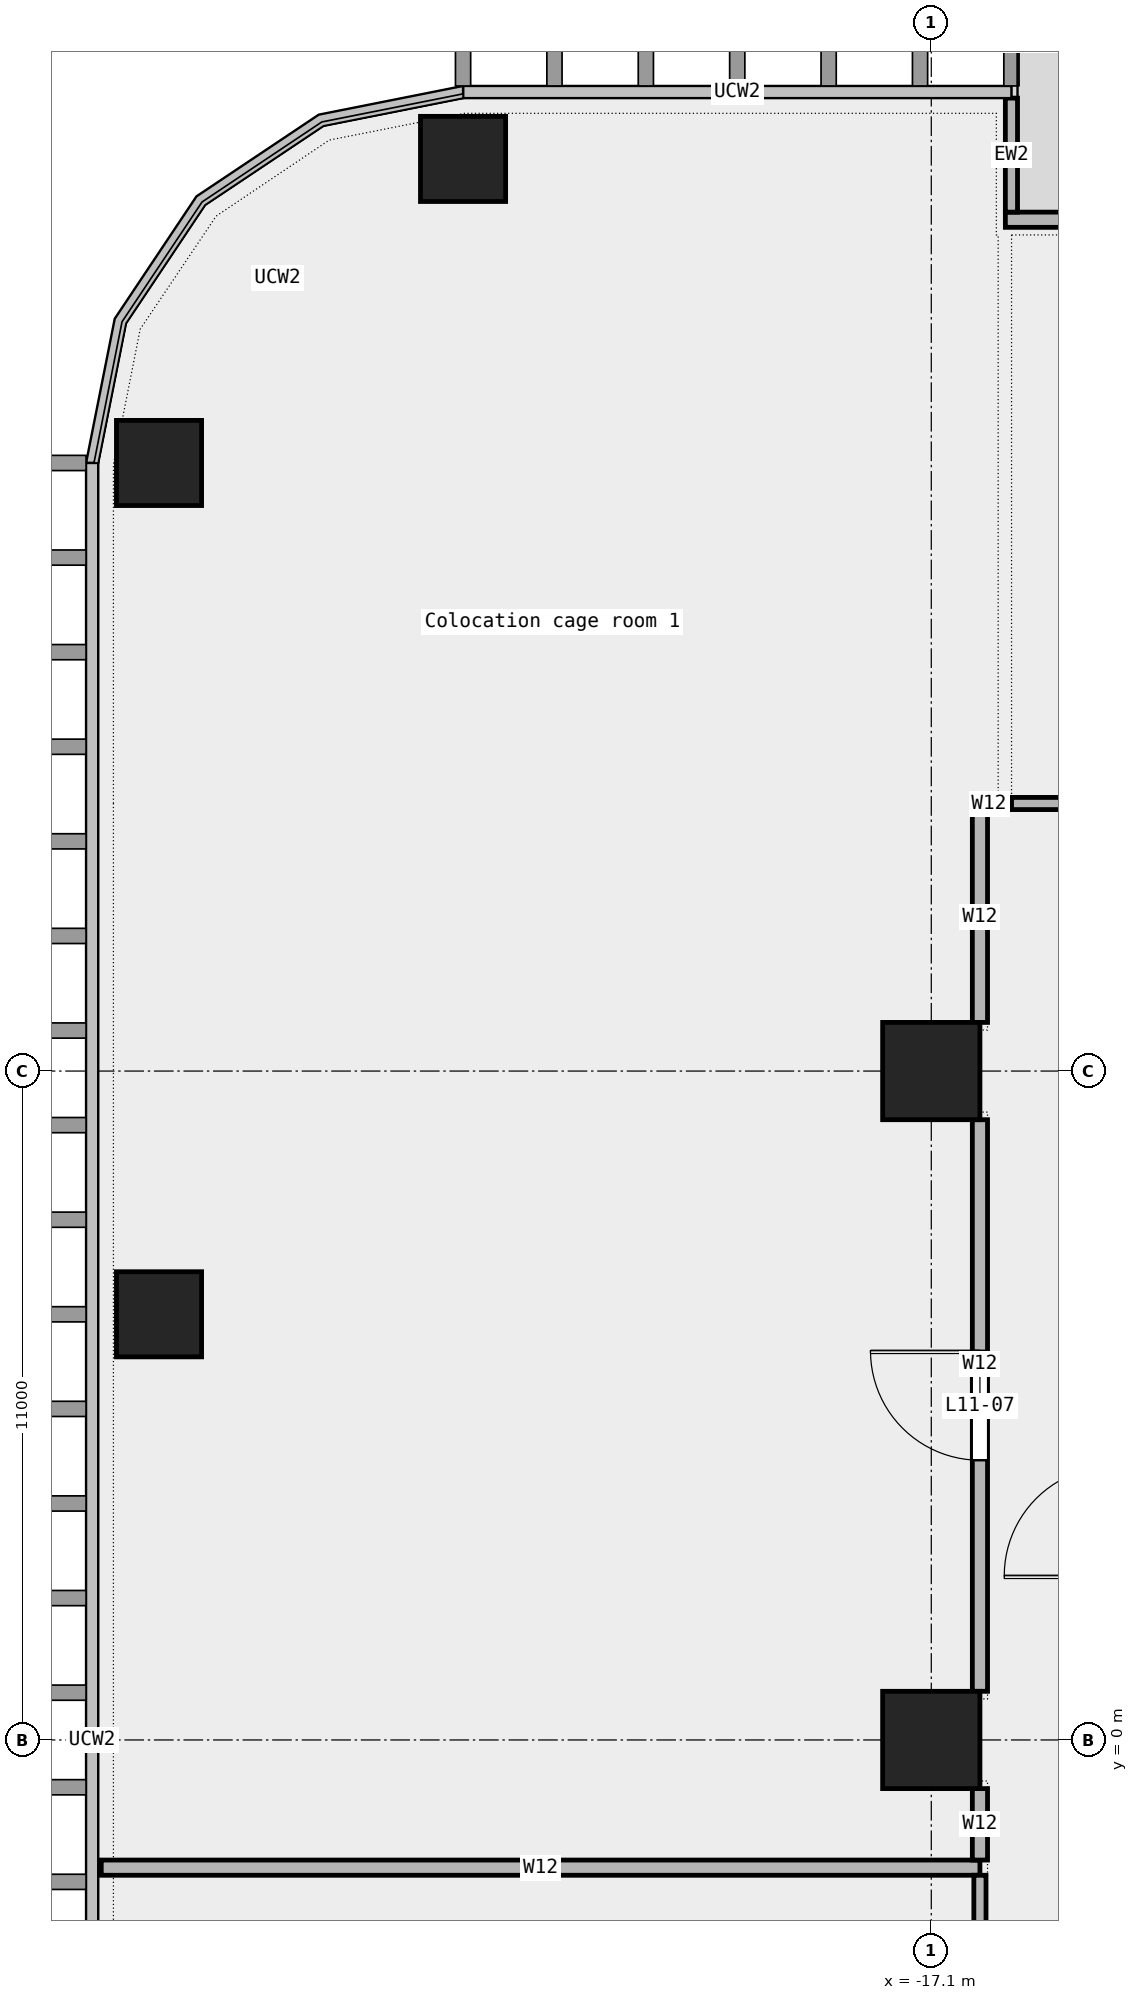
"""IFC4 building model, lengths in metres.
Left out: names, types, materials, properties, quantities, classifications, styles, units other than length and angle.
Written with IfcOpenShell. Run it as: python <this file> out.ifc"""

import sys

from ifc_helpers import new_model, si_unit, direction, frame, frame_2d, origin, origin_2d, place, context, subcontext, project, spatial, rectangle, extrude, element, fill, save


model = new_model("IFC4")
c1 = context("Model", 3, precision=1e-05, world=origin(), true_north=direction((0.0, 1.0)))
c2 = subcontext(c1, "Body", "Model", "MODEL_VIEW")
j1 = project(units=[si_unit("LENGTHUNIT", "METRE"), si_unit("PLANEANGLEUNIT", "RADIAN")], contexts=[c1])
p1 = place(None, origin())
s1 = spatial("IfcSite", under=j1, at=p1, CompositionType="ELEMENT")
p2 = place(p1, origin())
s2 = spatial("IfcBuilding", under=s1, at=p2, CompositionType="ELEMENT")
p3 = place(p2, frame((0.0, 0.0, 59.8)))
s3 = spatial("IfcBuildingStorey", under=s2, at=p3, CompositionType="ELEMENT", Elevation=59.8)
for number, where, z_axis, x_axis in (
    (1, (-24.8, 26.0, 0.0), (0.0, 0.0, 1.0), (1.0, 0.0, 0.0)),
    (2, (-29.8, 21.0, 0.0), (0.0, 0.0, 1.0), (1.0, 0.0, 0.0)),
    (3, (-29.8, 7.0, 0.0), (0.0, 0.0, 1.0), (1.0, 0.0, 0.0)),
):
    element("IfcColumn", number, at=place(p3, frame(where, z_axis=z_axis, x_axis=x_axis)), inside=s3, PredefinedType="COLUMN", context=c2, shape_type="SweptSolid", body=[
        extrude(rectangle(XDim=1.4, YDim=1.4, at=origin_2d()), origin(), (0.0, 0.0, 1.0), 4.35),
    ])
for number, where, z_axis, x_axis in (
    (4, (-17.1, 0.0, 0.0), (0.0, 0.0, 1.0), (1.0, 0.0, 0.0)),
    (5, (-17.1, 11.0, 0.0), (0.0, 0.0, 1.0), (1.0, 0.0, 0.0)),
):
    element("IfcColumn", number, at=place(p3, frame(where, z_axis=z_axis, x_axis=x_axis)), inside=s3, PredefinedType="COLUMN", context=c2, shape_type="SweptSolid", body=[
        extrude(rectangle(XDim=1.6, YDim=1.6, at=origin_2d()), origin(), (0.0, 0.0, 1.0), 4.35),
    ])
p4 = place(p3, frame((-2.155, 25.0, 0.0), z_axis=(0.0, 0.0, 1.0), x_axis=(-1.0, 0.0, 0.0)))
e6 = element("IfcWall", 6, at=p4, inside=s3, PredefinedType="STANDARD", context=c2, shape_type="SweptSolid", body=[
    extrude(rectangle(XDim=13.727, YDim=0.25, at=frame_2d((6.864, 0.0))), origin(), (0.0, 0.0, 1.0), 4.35),
])
p5 = place(p4, frame((1.75, 0.0, 0.45)))
e7 = element("IfcOpeningElement", 7, at=p5, cuts=e6, PredefinedType="OPENING", context=c2, shape_type="SweptSolid", body=[
    extrude(rectangle(XDim=1.5, YDim=3.0, at=frame_2d((0.75, 1.5))), frame((0.0, 0.137, 0.0), z_axis=(0.0, -1.0, 0.0), x_axis=(1.0, 0.0, 0.0)), (0.0, 0.0, 1.0), 0.274),
])
p6 = place(p4, frame((6.0, 0.0, 0.0)))
e8 = element("IfcOpeningElement", 8, at=p6, cuts=e6, PredefinedType="OPENING", context=c2, shape_type="SweptSolid", body=[
    extrude(rectangle(XDim=1.8, YDim=2.4, at=frame_2d((0.9, 1.2))), frame((0.0, 0.137, 0.0), z_axis=(0.0, -1.0, 0.0), x_axis=(1.0, 0.0, 0.0)), (0.0, 0.0, 1.0), 0.274),
])
p7 = place(p4, frame((11.25, 0.0, 0.45)))
e9 = element("IfcOpeningElement", 9, at=p7, cuts=e6, PredefinedType="OPENING", context=c2, shape_type="SweptSolid", body=[
    extrude(rectangle(XDim=1.5, YDim=3.0, at=frame_2d((0.75, 1.5))), frame((0.0, 0.137, 0.0), z_axis=(0.0, -1.0, 0.0), x_axis=(1.0, 0.0, 0.0)), (0.0, 0.0, 1.0), 0.274),
])
p8 = place(p3, frame((-15.782, 27.0, 0.0), z_axis=(0.0, 0.0, 1.0), x_axis=(0.0, -1.0, 0.0)))
e10 = element("IfcWall", 10, at=p8, inside=s3, PredefinedType="STANDARD", context=c2, shape_type="SweptSolid", body=[
    extrude(rectangle(XDim=1.875, YDim=0.2, at=frame_2d((0.938, 0.0))), origin(), (0.0, 0.0, 1.0), 4.35),
])
p9 = place(p3, frame((-30.75, -2.1, 0.0), z_axis=(0.0, 0.0, 1.0), x_axis=(1.0, 0.0, 0.0)))
e11 = element("IfcWall", 11, at=p9, inside=s3, PredefinedType="PARTITIONING", context=c2, shape_type="SweptSolid", body=[
    extrude(rectangle(XDim=14.45, YDim=0.25, at=frame_2d((7.225, 0.0))), origin(), (0.0, 0.0, 1.0), 4.35),
])
p10 = place(p3, frame((-15.78, 15.4, 0.0), z_axis=(0.0, 0.0, 1.0), x_axis=(1.0, 0.0, 0.0)))
e12 = element("IfcWall", 12, at=p10, inside=s3, PredefinedType="PARTITIONING", context=c2, shape_type="SweptSolid", body=[
    extrude(rectangle(XDim=25.965, YDim=0.2, at=frame_2d((12.982, 0.0))), origin(), (0.0, 0.0, 1.0), 4.35),
])
p11 = place(p10, frame((19.395, 0.0, 0.0)))
e13 = element("IfcOpeningElement", 13, at=p11, cuts=e12, PredefinedType="OPENING", context=c2, shape_type="SweptSolid", body=[
    extrude(rectangle(XDim=1.5, YDim=2.1, at=frame_2d((0.75, 1.05))), frame((0.0, 0.112, 0.0), z_axis=(0.0, -1.0, 0.0), x_axis=(1.0, 0.0, 0.0)), (0.0, 0.0, 1.0), 0.224),
])
p12 = place(p10, frame((6.012, 0.0, 0.0)))
e14 = element("IfcOpeningElement", 14, at=p12, cuts=e12, PredefinedType="OPENING", context=c2, shape_type="SweptSolid", body=[
    extrude(rectangle(XDim=1.5, YDim=2.1, at=frame_2d((0.75, 1.05))), frame((0.0, 0.112, 0.0), z_axis=(0.0, -1.0, 0.0), x_axis=(1.0, 0.0, 0.0)), (0.0, 0.0, 1.0), 0.224),
])
p13 = place(p3, frame((-16.3, 15.4, 0.0), z_axis=(0.0, 0.0, 1.0), x_axis=(1.0, 0.0, 0.0)))
e15 = element("IfcWall", 15, at=p13, inside=s3, PredefinedType="PARTITIONING", context=c2, shape_type="SweptSolid", body=[
    extrude(rectangle(XDim=0.3, YDim=0.25, at=frame_2d((0.15, 0.0))), origin(), (0.0, 0.0, 1.0), 4.35),
])
p14 = place(p3, frame((-16.3, -8.975, 0.0), z_axis=(0.0, 0.0, 1.0), x_axis=(0.0, 1.0, 0.0)))
e16 = element("IfcWall", 16, at=p14, inside=s3, PredefinedType="PARTITIONING", context=c2, shape_type="SweptSolid", body=[
    extrude(rectangle(XDim=6.75, YDim=0.2, at=frame_2d((3.375, 0.0))), origin(), (0.0, 0.0, 1.0), 4.35),
])
p15 = place(p14, frame((2.625, 0.0, 0.0)))
e17 = element("IfcOpeningElement", 17, at=p15, cuts=e16, PredefinedType="OPENING", context=c2, shape_type="SweptSolid", body=[
    extrude(rectangle(XDim=1.5, YDim=2.1, at=frame_2d((0.75, 1.05))), frame((0.0, 0.112, 0.0), z_axis=(0.0, -1.0, 0.0), x_axis=(1.0, 0.0, 0.0)), (0.0, 0.0, 1.0), 0.224),
])
p16 = place(p3, frame((-16.3, -1.975, 0.0), z_axis=(0.0, 0.0, 1.0), x_axis=(0.0, 1.0, 0.0)))
e18 = element("IfcWall", 18, at=p16, inside=s3, PredefinedType="PARTITIONING", context=c2, shape_type="SweptSolid", body=[
    extrude(rectangle(XDim=1.175, YDim=0.25, at=frame_2d((0.587, 0.0))), origin(), (0.0, 0.0, 1.0), 4.35),
])
p17 = place(p3, frame((-16.3, 0.8, 0.0), z_axis=(0.0, 0.0, 1.0), x_axis=(0.0, 1.0, 0.0)))
e19 = element("IfcWall", 19, at=p17, inside=s3, PredefinedType="PARTITIONING", context=c2, shape_type="SweptSolid", body=[
    extrude(rectangle(XDim=9.4, YDim=0.25, at=frame_2d((4.7, 0.0))), origin(), (0.0, 0.0, 1.0), 4.35),
])
p18 = place(p17, frame((3.8, 0.0, 0.0)))
e20 = element("IfcOpeningElement", 20, at=p18, cuts=e19, PredefinedType="OPENING", context=c2, shape_type="SweptSolid", body=[
    extrude(rectangle(XDim=1.8, YDim=2.1, at=frame_2d((0.9, 1.05))), frame((0.0, 0.137, 0.0), z_axis=(0.0, -1.0, 0.0), x_axis=(1.0, 0.0, 0.0)), (0.0, 0.0, 1.0), 0.274),
])
p19 = place(p3, frame((-16.3, 11.8, 0.0), z_axis=(0.0, 0.0, 1.0), x_axis=(0.0, 1.0, 0.0)))
e21 = element("IfcWall", 21, at=p19, inside=s3, PredefinedType="PARTITIONING", context=c2, shape_type="SweptSolid", body=[
    extrude(rectangle(XDim=3.475, YDim=0.25, at=frame_2d((1.737, 0.0))), origin(), (0.0, 0.0, 1.0), 4.35),
])
p20 = place(p18, origin())
e22 = element("IfcDoor", 22, at=p20, inside=s3, OperationType="DOUBLE_DOOR_SINGLE_SWING", PredefinedType="DOOR", context=c2, shape_type="SweptSolid", body=[
    extrude(rectangle(XDim=1.8, YDim=2.1, at=frame_2d((0.9, 1.05))), frame((0.0, 0.025, 0.0), z_axis=(0.0, -1.0, 0.0), x_axis=(1.0, 0.0, 0.0)), (0.0, 0.0, 1.0), 0.05),
])
fill(e20, e22)
save(model, sys.argv[1])
